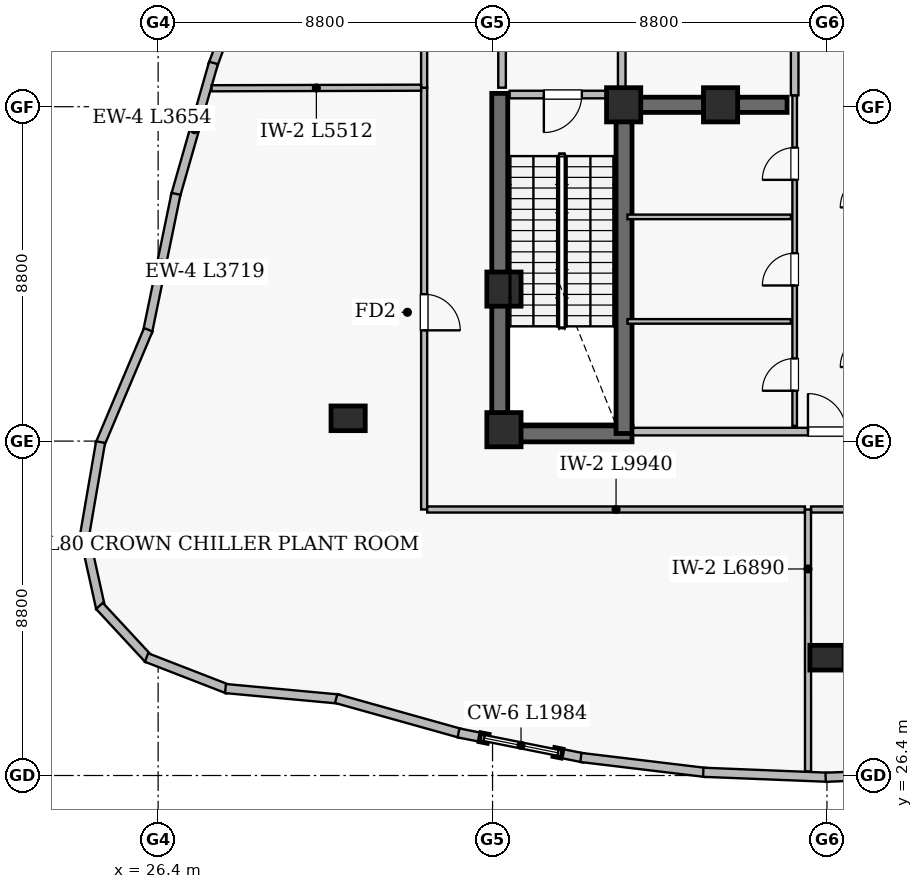
"""IFC4 building model, lengths in metres.
Left out: names, types, materials, properties, quantities, classifications, styles, units other than length and angle.
Written with IfcOpenShell. Run it as: python <this file> out.ifc"""

import sys

from ifc_helpers import new_model, si_unit, direction, frame, frame_2d, origin, origin_2d, place, context, subcontext, project, spatial, rectangle, extrude, element, fill, save


model = new_model("IFC4")
c1 = context("Model", 3, precision=1e-05, world=origin(), true_north=direction((0.0, 1.0)))
c2 = subcontext(c1, "Body", "Model", "MODEL_VIEW")
j1 = project(units=[si_unit("LENGTHUNIT", "METRE"), si_unit("PLANEANGLEUNIT", "RADIAN")], contexts=[c1])
p1 = place(None, origin())
s1 = spatial("IfcSite", under=j1, at=p1, CompositionType="ELEMENT")
p2 = place(p1, origin())
s2 = spatial("IfcBuilding", under=s1, at=p2, CompositionType="ELEMENT")
p3 = place(p2, frame((0.0, 0.0, 300.8)))
s3 = spatial("IfcBuildingStorey", under=s2, at=p3, CompositionType="ELEMENT", Elevation=300.8)
p4 = place(p3, frame((35.18, 35.39, 0.0), z_axis=(0.0, 0.0, 1.0), x_axis=(1.0, 0.0, 0.0)))
e1 = element("IfcWall", 1, at=p4, inside=s3, PredefinedType="SHEAR", context=c2, shape_type="SweptSolid", body=[
    extrude(rectangle(XDim=3.69, YDim=0.42, at=frame_2d((1.845, 0.0))), origin(), (0.0, 0.0, 1.0), 5.74),
])
p5 = place(p3, frame((35.39, 35.18, 0.0), z_axis=(0.0, 0.0, 1.0), x_axis=(0.0, 1.0, 0.0)))
e2 = element("IfcWall", 2, at=p5, inside=s3, PredefinedType="SHEAR", context=c2, shape_type="SweptSolid", body=[
    extrude(rectangle(XDim=9.17, YDim=0.42, at=frame_2d((4.585, 0.0))), origin(), (0.0, 0.0, 1.0), 5.74),
])
p6 = place(p3, frame((38.66, 35.4, 0.0), z_axis=(0.0, 0.0, 1.0), x_axis=(0.0, 1.0, 0.0)))
e3 = element("IfcWall", 3, at=p6, inside=s3, PredefinedType="SHEAR", context=c2, shape_type="SweptSolid", body=[
    extrude(rectangle(XDim=8.95, YDim=0.42, at=frame_2d((4.475, 0.0))), origin(), (0.0, 0.0, 1.0), 5.74),
])
p7 = place(p3, frame((38.75, 44.05, 0.0), z_axis=(0.0, 0.0, 1.0), x_axis=(1.0, 0.0, 0.0)))
e4 = element("IfcWall", 4, at=p7, inside=s3, PredefinedType="SHEAR", context=c2, shape_type="SweptSolid", body=[
    extrude(rectangle(XDim=4.2, YDim=0.4, at=frame_2d((2.1, 0.0))), origin(), (0.0, 0.0, 1.0), 5.74),
])
for number, where, z_axis, x_axis in (
    (5, (35.5, 35.5, 0.0), (0.0, 0.0, 1.0), (1.0, 0.0, 0.0)),
    (6, (38.65, 44.05, 0.0), (0.0, 0.0, 1.0), (1.0, 0.0, 0.0)),
    (7, (35.5, 39.2, 0.0), (0.0, 0.0, 1.0), (1.0, 0.0, 0.0)),
    (8, (41.2, 44.05, 0.0), (0.0, 0.0, 1.0), (1.0, 0.0, 0.0)),
):
    element("IfcColumn", number, at=place(p3, frame(where, z_axis=z_axis, x_axis=x_axis)), inside=s3, PredefinedType="COLUMN", context=c2, shape_type="SweptSolid", body=[
        extrude(rectangle(XDim=0.9, YDim=0.9, at=origin_2d()), origin(), (0.0, 0.0, 1.0), 6.0),
    ])
for number, where, z_axis, x_axis in (
    (9, (44.0, 29.5, 0.0), (0.0, 0.0, 1.0), (1.0, 0.0, 0.0)),
    (10, (31.4, 35.8, 0.0), (0.0, 0.0, 1.0), (1.0, 0.0, 0.0)),
):
    element("IfcColumn", number, at=place(p3, frame(where, z_axis=z_axis, x_axis=x_axis)), inside=s3, PredefinedType="COLUMN", context=c2, shape_type="SweptSolid", body=[
        extrude(rectangle(XDim=0.9, YDim=0.65, at=origin_2d()), origin(), (0.0, 0.0, 1.0), 6.0),
    ])
p8 = place(p3, frame((29.096, 48.467, 0.0), z_axis=(0.0, 0.0, 1.0), x_axis=(-0.349054279873, -0.937102507574, 0.0)))
e11 = element("IfcWall", 11, at=p8, inside=s3, PredefinedType="SOLIDWALL", context=c2, shape_type="SweptSolid", body=[
    extrude(rectangle(XDim=3.609, YDim=0.24, at=frame_2d((1.805, 0.0))), origin(), (0.0, 0.0, 1.0), 5.74),
])
p9 = place(p3, frame((27.858, 45.152, 0.0), z_axis=(0.0, 0.0, 1.0), x_axis=(-0.274897629025, -0.961473501224, 0.0)))
e12 = element("IfcWall", 12, at=p9, inside=s3, PredefinedType="SOLIDWALL", context=c2, shape_type="SweptSolid", body=[
    extrude(rectangle(XDim=3.654, YDim=0.24, at=frame_2d((1.827, 0.0))), origin(), (0.0, 0.0, 1.0), 5.74),
])
p10 = place(p3, frame((26.871, 41.707, 0.0), z_axis=(0.0, 0.0, 1.0), x_axis=(-0.201578837363, -0.979472292782, 0.0)))
e13 = element("IfcWall", 13, at=p10, inside=s3, PredefinedType="SOLIDWALL", context=c2, shape_type="SweptSolid", body=[
    extrude(rectangle(XDim=3.719, YDim=0.24, at=frame_2d((1.86, 0.0))), origin(), (0.0, 0.0, 1.0), 5.74),
])
p11 = place(p3, frame((26.142, 38.13, 0.0), z_axis=(0.0, 0.0, 1.0), x_axis=(-0.388622520849, -0.921397056805, 0.0)))
e14 = element("IfcWall", 14, at=p11, inside=s3, PredefinedType="SOLIDWALL", context=c2, shape_type="SweptSolid", body=[
    extrude(rectangle(XDim=3.281, YDim=0.24, at=frame_2d((1.64, 0.0))), origin(), (0.0, 0.0, 1.0), 5.74),
])
p12 = place(p3, frame((24.886, 35.174, 0.0), z_axis=(0.0, 0.0, 1.0), x_axis=(-0.169240125324, -0.985574847477, 0.0)))
e15 = element("IfcWall", 15, at=p12, inside=s3, PredefinedType="SOLIDWALL", context=c2, shape_type="SweptSolid", body=[
    extrude(rectangle(XDim=2.526, YDim=0.24, at=frame_2d((1.263, 0.0))), origin(), (0.0, 0.0, 1.0), 5.74),
])
p13 = place(p3, frame((24.457, 32.753, 0.0), z_axis=(0.0, 0.0, 1.0), x_axis=(0.215649526387, -0.976470829963, 0.0)))
e16 = element("IfcWall", 16, at=p13, inside=s3, PredefinedType="SOLIDWALL", context=c2, shape_type="SweptSolid", body=[
    extrude(rectangle(XDim=1.998, YDim=0.24, at=frame_2d((0.999, 0.0))), origin(), (0.0, 0.0, 1.0), 5.74),
])
p14 = place(p3, frame((24.856, 30.862, 0.0), z_axis=(0.0, 0.0, 1.0), x_axis=(0.680072395428, -0.733144963139, 0.0)))
e17 = element("IfcWall", 17, at=p14, inside=s3, PredefinedType="SOLIDWALL", context=c2, shape_type="SweptSolid", body=[
    extrude(rectangle(XDim=1.905, YDim=0.24, at=frame_2d((0.952, 0.0))), origin(), (0.0, 0.0, 1.0), 5.74),
])
p15 = place(p3, frame((26.095, 29.504, 0.0), z_axis=(0.0, 0.0, 1.0), x_axis=(0.932269297358, -0.361765058019, 0.0)))
e18 = element("IfcWall", 18, at=p15, inside=s3, PredefinedType="SOLIDWALL", context=c2, shape_type="SweptSolid", body=[
    extrude(rectangle(XDim=2.301, YDim=0.24, at=frame_2d((1.15, 0.0))), origin(), (0.0, 0.0, 1.0), 5.74),
])
p16 = place(p3, frame((28.173, 28.688, 0.0), z_axis=(0.0, 0.0, 1.0), x_axis=(0.995767942029, -0.091903240575, 0.0)))
e19 = element("IfcWall", 19, at=p16, inside=s3, PredefinedType="SOLIDWALL", context=c2, shape_type="SweptSolid", body=[
    extrude(rectangle(XDim=2.994, YDim=0.24, at=frame_2d((1.497, 0.0))), origin(), (0.0, 0.0, 1.0), 5.74),
])
p17 = place(p3, frame((31.085, 28.425, 0.0), z_axis=(0.0, 0.0, 1.0), x_axis=(0.962972931592, -0.269598095359, 0.0)))
e20 = element("IfcWall", 20, at=p17, inside=s3, PredefinedType="SOLIDWALL", context=c2, shape_type="SweptSolid", body=[
    extrude(rectangle(XDim=3.414, YDim=0.24, at=frame_2d((1.707, 0.0))), origin(), (0.0, 0.0, 1.0), 5.74),
])
p18 = place(p3, frame((34.305, 27.521, 0.0), z_axis=(0.0, 0.0, 1.0), x_axis=(0.98052735431, -0.19638255383, 0.0)))
e21 = element("IfcWall", 21, at=p18, inside=s3, PredefinedType="SOLIDWALL", context=c2, shape_type="SweptSolid", body=[
    extrude(rectangle(XDim=0.705, YDim=0.24, at=frame_2d((0.353, 0.0))), origin(), (0.0, 0.0, 1.0), 5.74),
])
p19 = place(p3, frame((36.902, 27.002, 0.0), z_axis=(0.0, 0.0, 1.0), x_axis=(0.980540705023, -0.196315882679, 0.0)))
e22 = element("IfcWall", 22, at=p19, inside=s3, PredefinedType="SOLIDWALL", context=c2, shape_type="SweptSolid", body=[
    extrude(rectangle(XDim=0.705, YDim=0.24, at=frame_2d((0.353, 0.0))), origin(), (0.0, 0.0, 1.0), 5.74),
])
p20 = place(p3, frame((37.525, 26.875, 0.0), z_axis=(0.0, 0.0, 1.0), x_axis=(0.992868119477, -0.119217856572, 0.0)))
e23 = element("IfcWall", 23, at=p20, inside=s3, PredefinedType="SOLIDWALL", context=c2, shape_type="SweptSolid", body=[
    extrude(rectangle(XDim=3.313, YDim=0.24, at=frame_2d((1.657, 0.0))), origin(), (0.0, 0.0, 1.0), 5.74),
])
for number, where, z_axis, x_axis in (
    (24, (40.745, 26.485, 0.0), (0.0, 0.0, 1.0), (0.999, -0.04, 0.0)),
    (25, (43.965, 26.354, 0.0), (0.0, 0.0, 1.0), (0.999, 0.04, 0.0)),
):
    element("IfcWall", number, at=place(p3, frame(where, z_axis=z_axis, x_axis=x_axis)), inside=s3, PredefinedType="SOLIDWALL", context=c2, shape_type="SweptSolid", body=[
        extrude(rectangle(XDim=3.293, YDim=0.24, at=frame_2d((1.646, 0.0))), origin(), (0.0, 0.0, 1.0), 5.74),
    ])
p21 = place(p3, frame((33.4, 44.5, 0.0), z_axis=(0.0, 0.0, 1.0), x_axis=(0.0, -1.0, 0.0)))
e26 = element("IfcWall", 26, at=p21, inside=s3, PredefinedType="SOLIDWALL", context=c2, shape_type="SweptSolid", body=[
    extrude(rectangle(XDim=11.1, YDim=0.16, at=frame_2d((5.55, 0.0))), origin(), (0.0, 0.0, 1.0), 5.24),
])
p22 = place(p21, frame((5.435, 0.0, 0.0)))
e27 = element("IfcOpeningElement", 27, at=p22, cuts=e26, PredefinedType="OPENING", context=c2, shape_type="SweptSolid", body=[
    extrude(rectangle(XDim=0.95, YDim=2.15, at=frame_2d((0.475, 1.075))), frame((0.0, 0.09, 0.0), z_axis=(0.0, -1.0, 0.0), x_axis=(1.0, 0.0, 0.0)), (0.0, 0.0, 1.0), 0.18),
])
p23 = place(p3, frame((38.9, 35.45, 0.0), z_axis=(0.0, 0.0, 1.0), x_axis=(1.0, 0.0, 0.0)))
e28 = element("IfcWall", 28, at=p23, inside=s3, PredefinedType="SOLIDWALL", context=c2, shape_type="SweptSolid", body=[
    extrude(rectangle(XDim=10.2, YDim=0.2, at=frame_2d((5.1, 0.0))), origin(), (0.0, 0.0, 1.0), 5.74),
])
p24 = place(p23, frame((4.6, 0.0, 0.0)))
e29 = element("IfcOpeningElement", 29, at=p24, cuts=e28, PredefinedType="OPENING", context=c2, shape_type="SweptSolid", body=[
    extrude(rectangle(XDim=1.0, YDim=2.15, at=frame_2d((0.5, 1.075))), frame((0.0, 0.11, 0.0), z_axis=(0.0, -1.0, 0.0), x_axis=(1.0, 0.0, 0.0)), (0.0, 0.0, 1.0), 0.22),
])
p25 = place(p3, frame((43.15, 35.6, 0.0), z_axis=(0.0, 0.0, 1.0), x_axis=(0.0, 1.0, 0.0)))
e30 = element("IfcWall", 30, at=p25, inside=s3, PredefinedType="PARTITIONING", context=c2, shape_type="SweptSolid", body=[
    extrude(rectangle(XDim=8.7, YDim=0.12, at=frame_2d((4.35, 0.0))), origin(), (0.0, 0.0, 1.0), 5.74),
])
p26 = place(p25, frame((0.925, 0.0, 0.0)))
e31 = element("IfcOpeningElement", 31, at=p26, cuts=e30, PredefinedType="OPENING", context=c2, shape_type="SweptSolid", body=[
    extrude(rectangle(XDim=0.85, YDim=2.1, at=frame_2d((0.425, 1.05))), frame((0.0, 0.07, 0.0), z_axis=(0.0, -1.0, 0.0), x_axis=(1.0, 0.0, 0.0)), (0.0, 0.0, 1.0), 0.14),
])
p27 = place(p25, frame((3.695, 0.0, 0.0)))
e32 = element("IfcOpeningElement", 32, at=p27, cuts=e30, PredefinedType="OPENING", context=c2, shape_type="SweptSolid", body=[
    extrude(rectangle(XDim=0.85, YDim=2.1, at=frame_2d((0.425, 1.05))), frame((0.0, 0.07, 0.0), z_axis=(0.0, -1.0, 0.0), x_axis=(1.0, 0.0, 0.0)), (0.0, 0.0, 1.0), 0.14),
])
p28 = place(p25, frame((6.475, 0.0, 0.0)))
e33 = element("IfcOpeningElement", 33, at=p28, cuts=e30, PredefinedType="OPENING", context=c2, shape_type="SweptSolid", body=[
    extrude(rectangle(XDim=0.85, YDim=2.1, at=frame_2d((0.425, 1.05))), frame((0.0, 0.07, 0.0), z_axis=(0.0, -1.0, 0.0), x_axis=(1.0, 0.0, 0.0)), (0.0, 0.0, 1.0), 0.14),
])
p29 = place(p3, frame((35.45, 44.5, 0.0), z_axis=(0.0, 0.0, 1.0), x_axis=(0.0, 1.0, 0.0)))
e34 = element("IfcWall", 34, at=p29, inside=s3, PredefinedType="SOLIDWALL", context=c2, shape_type="SweptSolid", body=[
    extrude(rectangle(XDim=7.92, YDim=0.2, at=frame_2d((3.96, 0.0))), origin(), (0.0, 0.0, 1.0), 5.74),
])
p30 = place(p29, frame((2.6, 0.0, 0.0)))
e35 = element("IfcOpeningElement", 35, at=p30, cuts=e34, PredefinedType="OPENING", context=c2, shape_type="SweptSolid", body=[
    extrude(rectangle(XDim=1.0, YDim=2.15, at=frame_2d((0.5, 1.075))), frame((0.0, 0.11, 0.0), z_axis=(0.0, -1.0, 0.0), x_axis=(1.0, 0.0, 0.0)), (0.0, 0.0, 1.0), 0.22),
])
p31 = place(p3, frame((38.6, 44.5, 0.0), z_axis=(0.0, 0.0, 1.0), x_axis=(0.0, 1.0, 0.0)))
e36 = element("IfcWall", 36, at=p31, inside=s3, PredefinedType="SOLIDWALL", context=c2, shape_type="SweptSolid", body=[
    extrude(rectangle(XDim=7.92, YDim=0.2, at=frame_2d((3.96, 0.0))), origin(), (0.0, 0.0, 1.0), 5.74),
])
p32 = place(p31, frame((3.425, 0.0, 0.0)))
e37 = element("IfcOpeningElement", 37, at=p32, cuts=e36, PredefinedType="OPENING", context=c2, shape_type="SweptSolid", body=[
    extrude(rectangle(XDim=0.95, YDim=2.15, at=frame_2d((0.475, 1.075))), frame((0.0, 0.11, 0.0), z_axis=(0.0, -1.0, 0.0), x_axis=(1.0, 0.0, 0.0)), (0.0, 0.0, 1.0), 0.22),
])
p33 = place(p3, frame((35.65, 44.32, 0.0), z_axis=(0.0, 0.0, 1.0), x_axis=(1.0, 0.0, 0.0)))
e38 = element("IfcWall", 38, at=p33, inside=s3, PredefinedType="SOLIDWALL", context=c2, shape_type="SweptSolid", body=[
    extrude(rectangle(XDim=2.8, YDim=0.2, at=frame_2d((1.4, 0.0))), origin(), (0.0, 0.0, 1.0), 5.74),
])
p34 = place(p33, frame((0.9, 0.0, 0.0)))
e39 = element("IfcOpeningElement", 39, at=p34, cuts=e38, PredefinedType="OPENING", context=c2, shape_type="SweptSolid", body=[
    extrude(rectangle(XDim=1.0, YDim=2.15, at=frame_2d((0.5, 1.075))), frame((0.0, 0.11, 0.0), z_axis=(0.0, -1.0, 0.0), x_axis=(1.0, 0.0, 0.0)), (0.0, 0.0, 1.0), 0.22),
])
p35 = place(p3, frame((43.58, 33.4, 0.0), z_axis=(0.0, 0.0, 1.0), x_axis=(1.0, 0.0, 0.0)))
e40 = element("IfcWall", 40, at=p35, inside=s3, PredefinedType="SOLIDWALL", context=c2, shape_type="SweptSolid", body=[
    extrude(rectangle(XDim=10.94, YDim=0.16, at=frame_2d((5.47, 0.0))), origin(), (0.0, 0.0, 1.0), 5.24),
])
p36 = place(p3, frame((33.4, 54.6, 0.0), z_axis=(0.0, 0.0, 1.0), x_axis=(0.0, -1.0, 0.0)))
e41 = element("IfcWall", 41, at=p36, inside=s3, PredefinedType="SOLIDWALL", context=c2, shape_type="SweptSolid", body=[
    extrude(rectangle(XDim=10.1, YDim=0.16, at=frame_2d((5.05, 0.0))), origin(), (0.0, 0.0, 1.0), 5.24),
])
p37 = place(p3, frame((33.48, 33.4, 0.0), z_axis=(0.0, 0.0, 1.0), x_axis=(1.0, 0.0, 0.0)))
e42 = element("IfcWall", 42, at=p37, inside=s3, PredefinedType="SOLIDWALL", context=c2, shape_type="SweptSolid", body=[
    extrude(rectangle(XDim=9.94, YDim=0.16, at=frame_2d((4.97, 0.0))), origin(), (0.0, 0.0, 1.0), 5.24),
])
p38 = place(p3, frame((43.502, 26.51, 0.0), z_axis=(0.0, 0.0, 1.0), x_axis=(-0.000283476832, 0.99999995982, 0.0)))
e43 = element("IfcWall", 43, at=p38, inside=s3, PredefinedType="SOLIDWALL", context=c2, shape_type="SweptSolid", body=[
    extrude(rectangle(XDim=6.89, YDim=0.16, at=frame_2d((3.445, 0.0))), origin(), (0.0, 0.0, 1.0), 5.24),
])
p39 = place(p3, frame((33.32, 44.5, 0.0), z_axis=(0.0, 0.0, 1.0), x_axis=(-0.999996349983, -0.002701854868, 0.0)))
e44 = element("IfcWall", 44, at=p39, inside=s3, PredefinedType="SOLIDWALL", context=c2, shape_type="SweptSolid", body=[
    extrude(rectangle(XDim=5.512, YDim=0.16, at=frame_2d((2.756, 0.0))), origin(), (0.0, 0.0, 1.0), 5.24),
])
for number, where, z_axis, x_axis in (
    (45, (38.75, 38.35, 0.0), (0.0, 0.0, 1.0), (1.0, 0.0, 0.0)),
    (46, (38.75, 41.1, 0.0), (0.0, 0.0, 1.0), (1.0, 0.0, 0.0)),
):
    element("IfcWall", number, at=place(p3, frame(where, z_axis=z_axis, x_axis=x_axis)), inside=s3, PredefinedType="PARTITIONING", context=c2, shape_type="SweptSolid", body=[
        extrude(rectangle(XDim=4.3, YDim=0.12, at=frame_2d((2.15, 0.0))), origin(), (0.0, 0.0, 1.0), 5.74),
    ])
p40 = place(p3, frame((43.15, 44.3, 0.0), z_axis=(0.0, 0.0, 1.0), x_axis=(0.0, 1.0, 0.0)))
e47 = element("IfcWall", 47, at=p40, inside=s3, PredefinedType="SOLIDWALL", context=c2, shape_type="SweptSolid", body=[
    extrude(rectangle(XDim=2.58, YDim=0.2, at=frame_2d((1.29, 0.0))), origin(), (0.0, 0.0, 1.0), 5.74),
])
p41 = place(p34, frame((1.0, 0.0, 0.0), z_axis=(0.0, 0.0, 1.0), x_axis=(-1.0, 0.0, 0.0)))
e48 = element("IfcDoor", 48, at=p41, inside=s3, OperationType="SINGLE_SWING_LEFT", PredefinedType="DOOR", context=c2, shape_type="SweptSolid", body=[
    extrude(rectangle(XDim=1.0, YDim=2.15, at=frame_2d((0.5, 1.075))), frame((0.0, 0.025, 0.0), z_axis=(0.0, -1.0, 0.0), x_axis=(1.0, 0.0, 0.0)), (0.0, 0.0, 1.0), 0.05),
])
fill(e39, e48)
p42 = place(p24, origin())
e49 = element("IfcDoor", 49, at=p42, inside=s3, OperationType="SINGLE_SWING_LEFT", PredefinedType="DOOR", context=c2, shape_type="SweptSolid", body=[
    extrude(rectangle(XDim=1.0, YDim=2.15, at=frame_2d((0.5, 1.075))), frame((0.0, 0.025, 0.0), z_axis=(0.0, -1.0, 0.0), x_axis=(1.0, 0.0, 0.0)), (0.0, 0.0, 1.0), 0.05),
])
fill(e29, e49)
p43 = place(p26, origin())
e50 = element("IfcDoor", 50, at=p43, inside=s3, OperationType="SINGLE_SWING_LEFT", PredefinedType="DOOR", context=c2, shape_type="SweptSolid", body=[
    extrude(rectangle(XDim=0.85, YDim=2.1, at=frame_2d((0.425, 1.05))), frame((0.0, 0.025, 0.0), z_axis=(0.0, -1.0, 0.0), x_axis=(1.0, 0.0, 0.0)), (0.0, 0.0, 1.0), 0.05),
])
fill(e31, e50)
p44 = place(p27, origin())
e51 = element("IfcDoor", 51, at=p44, inside=s3, OperationType="SINGLE_SWING_LEFT", PredefinedType="DOOR", context=c2, shape_type="SweptSolid", body=[
    extrude(rectangle(XDim=0.85, YDim=2.1, at=frame_2d((0.425, 1.05))), frame((0.0, 0.025, 0.0), z_axis=(0.0, -1.0, 0.0), x_axis=(1.0, 0.0, 0.0)), (0.0, 0.0, 1.0), 0.05),
])
fill(e32, e51)
p45 = place(p28, origin())
e52 = element("IfcDoor", 52, at=p45, inside=s3, OperationType="SINGLE_SWING_LEFT", PredefinedType="DOOR", context=c2, shape_type="SweptSolid", body=[
    extrude(rectangle(XDim=0.85, YDim=2.1, at=frame_2d((0.425, 1.05))), frame((0.0, 0.025, 0.0), z_axis=(0.0, -1.0, 0.0), x_axis=(1.0, 0.0, 0.0)), (0.0, 0.0, 1.0), 0.05),
])
fill(e33, e52)
p46 = place(p22, origin())
e53 = element("IfcDoor", 53, at=p46, inside=s3, OperationType="SINGLE_SWING_RIGHT", PredefinedType="DOOR", context=c2, shape_type="SweptSolid", body=[
    extrude(rectangle(XDim=0.95, YDim=2.15, at=frame_2d((0.475, 1.075))), frame((0.0, 0.025, 0.0), z_axis=(0.0, -1.0, 0.0), x_axis=(1.0, 0.0, 0.0)), (0.0, 0.0, 1.0), 0.05),
])
fill(e27, e53)
save(model, sys.argv[1])
